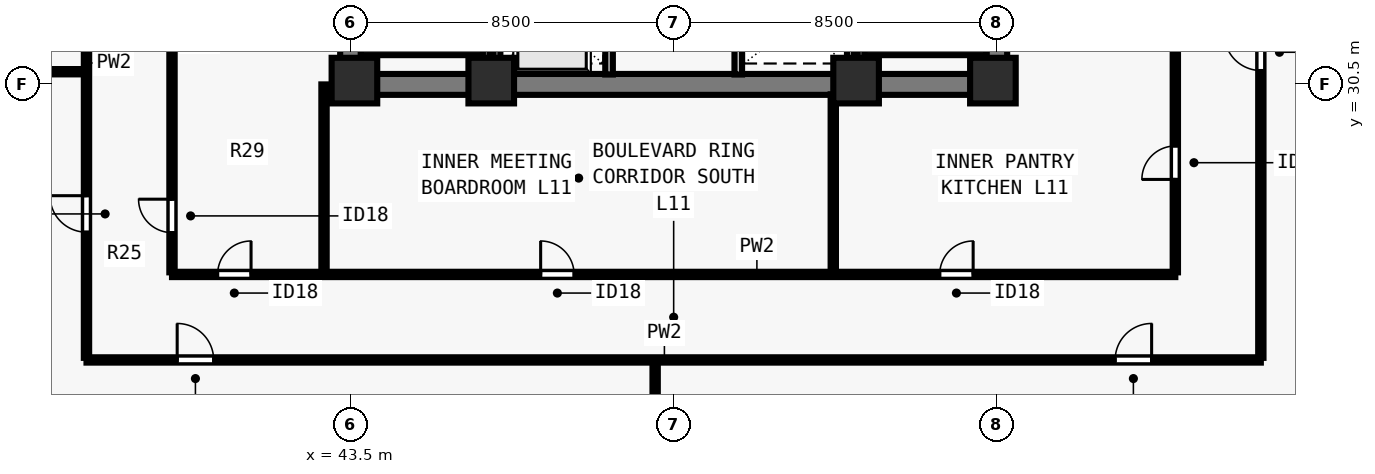
"""IFC4 building model, lengths in metres.
Left out: names, types, materials, properties, quantities, classifications, styles, units other than length and angle.
Written with IfcOpenShell. Run it as: python <this file> out.ifc"""

import sys

from ifc_helpers import new_model, si_unit, direction, frame, frame_2d, origin, origin_2d, place, context, subcontext, project, spatial, rectangle, extrude, element, fill, save


model = new_model("IFC4")
c1 = context("Model", 3, precision=1e-05, world=origin(), true_north=direction((0.0, 1.0)))
c2 = subcontext(c1, "Body", "Model", "MODEL_VIEW")
j1 = project(units=[si_unit("LENGTHUNIT", "METRE"), si_unit("PLANEANGLEUNIT", "RADIAN")], contexts=[c1])
p1 = place(None, origin())
s1 = spatial("IfcSite", under=j1, at=p1, CompositionType="ELEMENT")
p2 = place(p1, origin())
s2 = spatial("IfcBuilding", under=s1, at=p2, CompositionType="ELEMENT")
p3 = place(p2, frame((0.0, 0.0, 44.5)))
s3 = spatial("IfcBuildingStorey", under=s2, at=p3, CompositionType="ELEMENT", Elevation=44.5)
for number, where, z_axis, x_axis in (
    (1, (43.6, 30.6, 0.0), (0.0, 0.0, 1.0), (1.0, 0.0, 0.0)),
    (2, (47.2, 30.6, 0.0), (0.0, 0.0, 1.0), (1.0, 0.0, 0.0)),
    (3, (56.8, 30.6, 0.0), (0.0, 0.0, 1.0), (1.0, 0.0, 0.0)),
    (4, (60.4, 30.6, 0.0), (0.0, 0.0, 1.0), (1.0, 0.0, 0.0)),
):
    element("IfcColumn", number, at=place(p3, frame(where, z_axis=z_axis, x_axis=x_axis)), inside=s3, PredefinedType="COLUMN", context=c2, shape_type="SweptSolid", body=[
        extrude(rectangle(XDim=1.2, YDim=1.2, at=origin_2d()), origin(), (0.0, 0.0, 1.0), 3.5),
    ])
p4 = place(p3, frame((43.225, 30.5, 0.0), z_axis=(0.0, 0.0, 1.0), x_axis=(1.0, 0.0, 0.0)))
e5 = element("IfcWall", 5, at=p4, inside=s3, PredefinedType="SHEAR", context=c2, shape_type="SweptSolid", body=[
    extrude(rectangle(XDim=17.55, YDim=0.55, at=frame_2d((8.775, 0.0))), origin(), (0.0, 0.0, 1.0), 3.28),
])
for number, where, z_axis, x_axis in (
    (6, (43.5, 30.765, 0.0), (0.0, 0.0, 1.0), (0.0, 1.0, 0.0)),
    (7, (60.5, 30.765, 0.0), (0.0, 0.0, 1.0), (0.0, 1.0, 0.0)),
):
    element("IfcWall", number, at=place(p3, frame(where, z_axis=z_axis, x_axis=x_axis)), inside=s3, PredefinedType="SHEAR", context=c2, shape_type="SweptSolid", body=[
        extrude(rectangle(XDim=7.985, YDim=0.55, at=frame_2d((3.993, 0.0))), origin(), (0.0, 0.0, 1.0), 3.28),
    ])
p5 = place(p3, frame((50.3, 30.76, 0.0), z_axis=(0.0, 0.0, 1.0), x_axis=(0.0, 1.0, 0.0)))
e8 = element("IfcWall", 8, at=p5, inside=s3, PredefinedType="SOLIDWALL", context=c2, shape_type="SweptSolid", body=[
    extrude(rectangle(XDim=7.855, YDim=0.2, at=frame_2d((3.927, 0.0))), origin(), (0.0, 0.0, 1.0), 3.28),
])
p6 = place(p5, frame((0.79, 0.0, 0.0)))
e9 = element("IfcOpeningElement", 9, at=p6, cuts=e8, PredefinedType="OPENING", context=c2, shape_type="SweptSolid", body=[
    extrude(rectangle(XDim=1.1, YDim=2.2, at=frame_2d((0.55, 1.1))), frame((0.0, 0.11, 0.0), z_axis=(0.0, -1.0, 0.0), x_axis=(1.0, 0.0, 0.0)), (0.0, 0.0, 1.0), 0.22),
])
p7 = place(p5, frame((3.49, 0.0, 0.0)))
e10 = element("IfcOpeningElement", 10, at=p7, cuts=e8, PredefinedType="OPENING", context=c2, shape_type="SweptSolid", body=[
    extrude(rectangle(XDim=1.1, YDim=2.2, at=frame_2d((0.55, 1.1))), frame((0.0, 0.11, 0.0), z_axis=(0.0, -1.0, 0.0), x_axis=(1.0, 0.0, 0.0)), (0.0, 0.0, 1.0), 0.22),
])
p8 = place(p5, frame((6.19, 0.0, 0.0)))
e11 = element("IfcOpeningElement", 11, at=p8, cuts=e8, PredefinedType="OPENING", context=c2, shape_type="SweptSolid", body=[
    extrude(rectangle(XDim=1.1, YDim=2.2, at=frame_2d((0.55, 1.1))), frame((0.0, 0.11, 0.0), z_axis=(0.0, -1.0, 0.0), x_axis=(1.0, 0.0, 0.0)), (0.0, 0.0, 1.0), 0.22),
])
p9 = place(p3, frame((53.7, 30.76, 0.0), z_axis=(0.0, 0.0, 1.0), x_axis=(0.0, 1.0, 0.0)))
e12 = element("IfcWall", 12, at=p9, inside=s3, PredefinedType="SOLIDWALL", context=c2, shape_type="SweptSolid", body=[
    extrude(rectangle(XDim=7.855, YDim=0.2, at=frame_2d((3.927, 0.0))), origin(), (0.0, 0.0, 1.0), 3.28),
])
for number, where, z_axis, x_axis in (
    (13, (47.35, 30.76, 0.0), (0.0, 0.0, 1.0), (0.0, 1.0, 0.0)),
    (14, (56.65, 30.76, 0.0), (0.0, 0.0, 1.0), (0.0, 1.0, 0.0)),
):
    element("IfcWall", number, at=place(p3, frame(where, z_axis=z_axis, x_axis=x_axis)), inside=s3, PredefinedType="SOLIDWALL", context=c2, shape_type="SweptSolid", body=[
        extrude(rectangle(XDim=7.855, YDim=0.18, at=frame_2d((3.927, 0.0))), origin(), (0.0, 0.0, 1.0), 3.28),
    ])
p10 = place(p3, frame((36.55, 23.25, 0.0), z_axis=(0.0, 0.0, 1.0), x_axis=(1.0, 0.0, 0.0)))
e15 = element("IfcWall", 15, at=p10, inside=s3, PredefinedType="PARTITIONING", context=c2, shape_type="SweptSolid", body=[
    extrude(rectangle(XDim=30.9, YDim=0.14, at=frame_2d((15.45, 0.0))), origin(), (0.0, 0.0, 1.0), 3.28),
])
p11 = place(p10, frame((2.386, 0.0, 0.0)))
e16 = element("IfcOpeningElement", 16, at=p11, cuts=e15, PredefinedType="OPENING", context=c2, shape_type="SweptSolid", body=[
    extrude(rectangle(XDim=0.96, YDim=2.12, at=frame_2d((0.48, 1.06))), frame((0.0, 0.08, 0.0), z_axis=(0.0, -1.0, 0.0), x_axis=(1.0, 0.0, 0.0)), (0.0, 0.0, 1.0), 0.16),
])
p12 = place(p10, frame((27.066, 0.0, 0.0)))
e17 = element("IfcOpeningElement", 17, at=p12, cuts=e15, PredefinedType="OPENING", context=c2, shape_type="SweptSolid", body=[
    extrude(rectangle(XDim=0.96, YDim=2.12, at=frame_2d((0.48, 1.06))), frame((0.0, 0.08, 0.0), z_axis=(0.0, -1.0, 0.0), x_axis=(1.0, 0.0, 0.0)), (0.0, 0.0, 1.0), 0.16),
])
p13 = place(p3, frame((36.55, 23.305, 0.0), z_axis=(0.0, 0.0, 1.0), x_axis=(0.0, 1.0, 0.0)))
e18 = element("IfcWall", 18, at=p13, inside=s3, PredefinedType="PARTITIONING", context=c2, shape_type="SweptSolid", body=[
    extrude(rectangle(XDim=31.39, YDim=0.14, at=frame_2d((15.695, 0.0))), origin(), (0.0, 0.0, 1.0), 3.28),
])
p14 = place(p13, frame((3.307, 0.0, 0.0)))
e19 = element("IfcOpeningElement", 19, at=p14, cuts=e18, PredefinedType="OPENING", context=c2, shape_type="SweptSolid", body=[
    extrude(rectangle(XDim=0.96, YDim=2.12, at=frame_2d((0.48, 1.06))), frame((0.0, 0.08, 0.0), z_axis=(0.0, -1.0, 0.0), x_axis=(1.0, 0.0, 0.0)), (0.0, 0.0, 1.0), 0.16),
])
p15 = place(p13, frame((11.25, 0.0, 0.0)))
e20 = element("IfcOpeningElement", 20, at=p15, cuts=e18, PredefinedType="OPENING", context=c2, shape_type="SweptSolid", body=[
    extrude(rectangle(XDim=0.96, YDim=2.12, at=frame_2d((0.48, 1.06))), frame((0.0, 0.08, 0.0), z_axis=(0.0, -1.0, 0.0), x_axis=(1.0, 0.0, 0.0)), (0.0, 0.0, 1.0), 0.16),
])
p16 = place(p13, frame((19.075, 0.0, 0.0)))
e21 = element("IfcOpeningElement", 21, at=p16, cuts=e18, PredefinedType="OPENING", context=c2, shape_type="SweptSolid", body=[
    extrude(rectangle(XDim=0.96, YDim=2.12, at=frame_2d((0.48, 1.06))), frame((0.0, 0.08, 0.0), z_axis=(0.0, -1.0, 0.0), x_axis=(1.0, 0.0, 0.0)), (0.0, 0.0, 1.0), 0.16),
])
p17 = place(p13, frame((26.782, 0.0, 0.0)))
e22 = element("IfcOpeningElement", 22, at=p17, cuts=e18, PredefinedType="OPENING", context=c2, shape_type="SweptSolid", body=[
    extrude(rectangle(XDim=0.96, YDim=2.12, at=frame_2d((0.48, 1.06))), frame((0.0, 0.08, 0.0), z_axis=(0.0, -1.0, 0.0), x_axis=(1.0, 0.0, 0.0)), (0.0, 0.0, 1.0), 0.16),
])
p18 = place(p3, frame((67.45, 23.305, 0.0), z_axis=(0.0, 0.0, 1.0), x_axis=(0.0, 1.0, 0.0)))
e23 = element("IfcWall", 23, at=p18, inside=s3, PredefinedType="PARTITIONING", context=c2, shape_type="SweptSolid", body=[
    extrude(rectangle(XDim=31.39, YDim=0.14, at=frame_2d((15.695, 0.0))), origin(), (0.0, 0.0, 1.0), 3.28),
])
p19 = place(p18, frame((7.561, 0.0, 0.0)))
e24 = element("IfcOpeningElement", 24, at=p19, cuts=e23, PredefinedType="OPENING", context=c2, shape_type="SweptSolid", body=[
    extrude(rectangle(XDim=0.96, YDim=2.12, at=frame_2d((0.48, 1.06))), frame((0.0, 0.08, 0.0), z_axis=(0.0, -1.0, 0.0), x_axis=(1.0, 0.0, 0.0)), (0.0, 0.0, 1.0), 0.16),
])
p20 = place(p18, frame((23.211, 0.0, 0.0)))
e25 = element("IfcOpeningElement", 25, at=p20, cuts=e23, PredefinedType="OPENING", context=c2, shape_type="SweptSolid", body=[
    extrude(rectangle(XDim=0.96, YDim=2.12, at=frame_2d((0.48, 1.06))), frame((0.0, 0.08, 0.0), z_axis=(0.0, -1.0, 0.0), x_axis=(1.0, 0.0, 0.0)), (0.0, 0.0, 1.0), 0.16),
])
p21 = place(p3, frame((38.8, 25.5, 0.0), z_axis=(0.0, 0.0, 1.0), x_axis=(1.0, 0.0, 0.0)))
e26 = element("IfcWall", 26, at=p21, inside=s3, PredefinedType="PARTITIONING", context=c2, shape_type="SweptSolid", body=[
    extrude(rectangle(XDim=26.4, YDim=0.14, at=frame_2d((13.2, 0.0))), origin(), (0.0, 0.0, 1.0), 3.28),
])
p22 = place(p21, frame((1.2, 0.0, 0.0)))
e27 = element("IfcOpeningElement", 27, at=p22, cuts=e26, PredefinedType="OPENING", context=c2, shape_type="SweptSolid", body=[
    extrude(rectangle(XDim=0.88, YDim=2.1, at=frame_2d((0.44, 1.05))), frame((0.0, 0.08, 0.0), z_axis=(0.0, -1.0, 0.0), x_axis=(1.0, 0.0, 0.0)), (0.0, 0.0, 1.0), 0.16),
])
p23 = place(p21, frame((9.7, 0.0, 0.0)))
e28 = element("IfcOpeningElement", 28, at=p23, cuts=e26, PredefinedType="OPENING", context=c2, shape_type="SweptSolid", body=[
    extrude(rectangle(XDim=0.88, YDim=2.1, at=frame_2d((0.44, 1.05))), frame((0.0, 0.08, 0.0), z_axis=(0.0, -1.0, 0.0), x_axis=(1.0, 0.0, 0.0)), (0.0, 0.0, 1.0), 0.16),
])
p24 = place(p21, frame((20.2, 0.0, 0.0)))
e29 = element("IfcOpeningElement", 29, at=p24, cuts=e26, PredefinedType="OPENING", context=c2, shape_type="SweptSolid", body=[
    extrude(rectangle(XDim=0.88, YDim=2.1, at=frame_2d((0.44, 1.05))), frame((0.0, 0.08, 0.0), z_axis=(0.0, -1.0, 0.0), x_axis=(1.0, 0.0, 0.0)), (0.0, 0.0, 1.0), 0.16),
])
p25 = place(p3, frame((38.8, 25.555, 0.0), z_axis=(0.0, 0.0, 1.0), x_axis=(0.0, 1.0, 0.0)))
e30 = element("IfcWall", 30, at=p25, inside=s3, PredefinedType="PARTITIONING", context=c2, shape_type="SweptSolid", body=[
    extrude(rectangle(XDim=13.195, YDim=0.14, at=frame_2d((6.598, 0.0))), origin(), (0.0, 0.0, 1.0), 3.28),
])
p26 = place(p25, frame((1.045, 0.0, 0.0)))
e31 = element("IfcOpeningElement", 31, at=p26, cuts=e30, PredefinedType="OPENING", context=c2, shape_type="SweptSolid", body=[
    extrude(rectangle(XDim=0.88, YDim=2.1, at=frame_2d((0.44, 1.05))), frame((0.0, 0.08, 0.0), z_axis=(0.0, -1.0, 0.0), x_axis=(1.0, 0.0, 0.0)), (0.0, 0.0, 1.0), 0.16),
])
p27 = place(p25, frame((10.245, 0.0, 0.0)))
e32 = element("IfcOpeningElement", 32, at=p27, cuts=e30, PredefinedType="OPENING", context=c2, shape_type="SweptSolid", body=[
    extrude(rectangle(XDim=0.88, YDim=2.1, at=frame_2d((0.44, 1.05))), frame((0.0, 0.08, 0.0), z_axis=(0.0, -1.0, 0.0), x_axis=(1.0, 0.0, 0.0)), (0.0, 0.0, 1.0), 0.16),
])
p28 = place(p3, frame((65.2, 25.555, 0.0), z_axis=(0.0, 0.0, 1.0), x_axis=(0.0, 1.0, 0.0)))
e33 = element("IfcWall", 33, at=p28, inside=s3, PredefinedType="PARTITIONING", context=c2, shape_type="SweptSolid", body=[
    extrude(rectangle(XDim=13.195, YDim=0.14, at=frame_2d((6.598, 0.0))), origin(), (0.0, 0.0, 1.0), 3.28),
])
p29 = place(p28, frame((2.445, 0.0, 0.0)))
e34 = element("IfcOpeningElement", 34, at=p29, cuts=e33, PredefinedType="OPENING", context=c2, shape_type="SweptSolid", body=[
    extrude(rectangle(XDim=0.88, YDim=2.1, at=frame_2d((0.44, 1.05))), frame((0.0, 0.08, 0.0), z_axis=(0.0, -1.0, 0.0), x_axis=(1.0, 0.0, 0.0)), (0.0, 0.0, 1.0), 0.16),
])
p30 = place(p3, frame((42.8, 25.555, 0.0), z_axis=(0.0, 0.0, 1.0), x_axis=(0.0, 1.0, 0.0)))
e35 = element("IfcWall", 35, at=p30, inside=s3, PredefinedType="PARTITIONING", context=c2, shape_type="SweptSolid", body=[
    extrude(rectangle(XDim=4.945, YDim=0.14, at=frame_2d((2.473, 0.0))), origin(), (0.0, 0.0, 1.0), 2.439),
])
p31 = place(p3, frame((56.2, 25.555, 0.0), z_axis=(0.0, 0.0, 1.0), x_axis=(0.0, 1.0, 0.0)))
e36 = element("IfcWall", 36, at=p31, inside=s3, PredefinedType="PARTITIONING", context=c2, shape_type="SweptSolid", body=[
    extrude(rectangle(XDim=4.685, YDim=0.14, at=frame_2d((2.343, 0.0))), origin(), (0.0, 0.0, 1.0), 2.849),
])
p32 = place(p3, frame((51.512, 13.92, 0.0), z_axis=(0.0, 0.0, 1.0), x_axis=(0.0, 1.0, 0.0)))
e37 = element("IfcWall", 37, at=p32, inside=s3, PredefinedType="PARTITIONING", context=c2, shape_type="SweptSolid", body=[
    extrude(rectangle(XDim=9.23, YDim=0.14, at=frame_2d((4.615, 0.0))), origin(), (0.0, 0.0, 1.0), 2.849),
])
p33 = place(p3, frame((26.92, 30.834, 0.0), z_axis=(0.0, 0.0, 1.0), x_axis=(1.0, 0.0, 0.0)))
e38 = element("IfcWall", 38, at=p33, inside=s3, PredefinedType="PARTITIONING", context=c2, shape_type="SweptSolid", body=[
    extrude(rectangle(XDim=9.53, YDim=0.14, at=frame_2d((4.765, 0.0))), origin(), (0.0, 0.0, 1.0), 3.28),
])
p34 = place(p3, frame((43.765, 31.36, 0.0), z_axis=(0.0, 0.0, 1.0), x_axis=(1.0, 0.0, 0.0)))
e39 = element("IfcWall", 39, at=p34, inside=s3, PredefinedType="SOLIDWALL", context=c2, shape_type="SweptSolid", body=[
    extrude(rectangle(XDim=3.23, YDim=0.18, at=frame_2d((1.615, 0.0))), origin(), (0.0, 0.0, 1.0), 3.28),
])
p35 = place(p3, frame((47.07, 38.78, 0.0), z_axis=(0.0, 0.0, 1.0), x_axis=(0.0, -1.0, 0.0)))
e40 = element("IfcWall", 40, at=p35, inside=s3, PredefinedType="SOLIDWALL", context=c2, shape_type="SweptSolid", body=[
    extrude(rectangle(XDim=8.017, YDim=0.18, at=frame_2d((4.009, 0.0))), origin(), (0.0, 0.0, 1.0), 3.28),
])
p36 = place(p3, frame((57.005, 31.36, 0.0), z_axis=(0.0, 0.0, 1.0), x_axis=(1.0, 0.0, 0.0)))
e41 = element("IfcWall", 41, at=p36, inside=s3, PredefinedType="SOLIDWALL", context=c2, shape_type="SweptSolid", body=[
    extrude(rectangle(XDim=3.23, YDim=0.18, at=frame_2d((1.615, 0.0))), origin(), (0.0, 0.0, 1.0), 3.28),
])
p37 = place(p3, frame((56.93, 38.78, 0.0), z_axis=(0.0, 0.0, 1.0), x_axis=(0.0, -1.0, 0.0)))
e42 = element("IfcWall", 42, at=p37, inside=s3, PredefinedType="SOLIDWALL", context=c2, shape_type="SweptSolid", body=[
    extrude(rectangle(XDim=8.017, YDim=0.18, at=frame_2d((4.009, 0.0))), origin(), (0.0, 0.0, 1.0), 3.28),
])
p38 = place(p22, origin())
e43 = element("IfcDoor", 43, at=p38, inside=s3, OperationType="SINGLE_SWING_RIGHT", PredefinedType="DOOR", context=c2, shape_type="SweptSolid", body=[
    extrude(rectangle(XDim=0.88, YDim=2.1, at=frame_2d((0.44, 1.05))), frame((0.0, 0.025, 0.0), z_axis=(0.0, -1.0, 0.0), x_axis=(1.0, 0.0, 0.0)), (0.0, 0.0, 1.0), 0.05),
])
fill(e27, e43)
p39 = place(p23, origin())
e44 = element("IfcDoor", 44, at=p39, inside=s3, OperationType="SINGLE_SWING_LEFT", PredefinedType="DOOR", context=c2, shape_type="SweptSolid", body=[
    extrude(rectangle(XDim=0.88, YDim=2.1, at=frame_2d((0.44, 1.05))), frame((0.0, 0.025, 0.0), z_axis=(0.0, -1.0, 0.0), x_axis=(1.0, 0.0, 0.0)), (0.0, 0.0, 1.0), 0.05),
])
fill(e28, e44)
p40 = place(p24, origin())
e45 = element("IfcDoor", 45, at=p40, inside=s3, OperationType="SINGLE_SWING_RIGHT", PredefinedType="DOOR", context=c2, shape_type="SweptSolid", body=[
    extrude(rectangle(XDim=0.88, YDim=2.1, at=frame_2d((0.44, 1.05))), frame((0.0, 0.025, 0.0), z_axis=(0.0, -1.0, 0.0), x_axis=(1.0, 0.0, 0.0)), (0.0, 0.0, 1.0), 0.05),
])
fill(e29, e45)
p41 = place(p26, origin())
e46 = element("IfcDoor", 46, at=p41, inside=s3, OperationType="SINGLE_SWING_RIGHT", PredefinedType="DOOR", context=c2, shape_type="SweptSolid", body=[
    extrude(rectangle(XDim=0.88, YDim=2.1, at=frame_2d((0.44, 1.05))), frame((0.0, 0.025, 0.0), z_axis=(0.0, -1.0, 0.0), x_axis=(1.0, 0.0, 0.0)), (0.0, 0.0, 1.0), 0.05),
])
fill(e31, e46)
p42 = place(p29, origin())
e47 = element("IfcDoor", 47, at=p42, inside=s3, OperationType="SINGLE_SWING_LEFT", PredefinedType="DOOR", context=c2, shape_type="SweptSolid", body=[
    extrude(rectangle(XDim=0.88, YDim=2.1, at=frame_2d((0.44, 1.05))), frame((0.0, 0.025, 0.0), z_axis=(0.0, -1.0, 0.0), x_axis=(1.0, 0.0, 0.0)), (0.0, 0.0, 1.0), 0.05),
])
fill(e34, e47)
p43 = place(p11, origin())
e48 = element("IfcDoor", 48, at=p43, inside=s3, OperationType="SINGLE_SWING_LEFT", PredefinedType="DOOR", context=c2, shape_type="SweptSolid", body=[
    extrude(rectangle(XDim=0.96, YDim=2.12, at=frame_2d((0.48, 1.06))), frame((0.0, 0.025, 0.0), z_axis=(0.0, -1.0, 0.0), x_axis=(1.0, 0.0, 0.0)), (0.0, 0.0, 1.0), 0.05),
])
fill(e16, e48)
p44 = place(p12, origin())
e49 = element("IfcDoor", 49, at=p44, inside=s3, OperationType="SINGLE_SWING_RIGHT", PredefinedType="DOOR", context=c2, shape_type="SweptSolid", body=[
    extrude(rectangle(XDim=0.96, YDim=2.12, at=frame_2d((0.48, 1.06))), frame((0.0, 0.025, 0.0), z_axis=(0.0, -1.0, 0.0), x_axis=(1.0, 0.0, 0.0)), (0.0, 0.0, 1.0), 0.05),
])
fill(e17, e49)
p45 = place(p14, origin())
e50 = element("IfcDoor", 50, at=p45, inside=s3, OperationType="SINGLE_SWING_RIGHT", PredefinedType="DOOR", context=c2, shape_type="SweptSolid", body=[
    extrude(rectangle(XDim=0.96, YDim=2.12, at=frame_2d((0.48, 1.06))), frame((0.0, 0.025, 0.0), z_axis=(0.0, -1.0, 0.0), x_axis=(1.0, 0.0, 0.0)), (0.0, 0.0, 1.0), 0.05),
])
fill(e19, e50)
p46 = place(p19, origin())
e51 = element("IfcDoor", 51, at=p46, inside=s3, OperationType="SINGLE_SWING_RIGHT", PredefinedType="DOOR", context=c2, shape_type="SweptSolid", body=[
    extrude(rectangle(XDim=0.96, YDim=2.12, at=frame_2d((0.48, 1.06))), frame((0.0, 0.025, 0.0), z_axis=(0.0, -1.0, 0.0), x_axis=(1.0, 0.0, 0.0)), (0.0, 0.0, 1.0), 0.05),
])
fill(e24, e51)
save(model, sys.argv[1])
